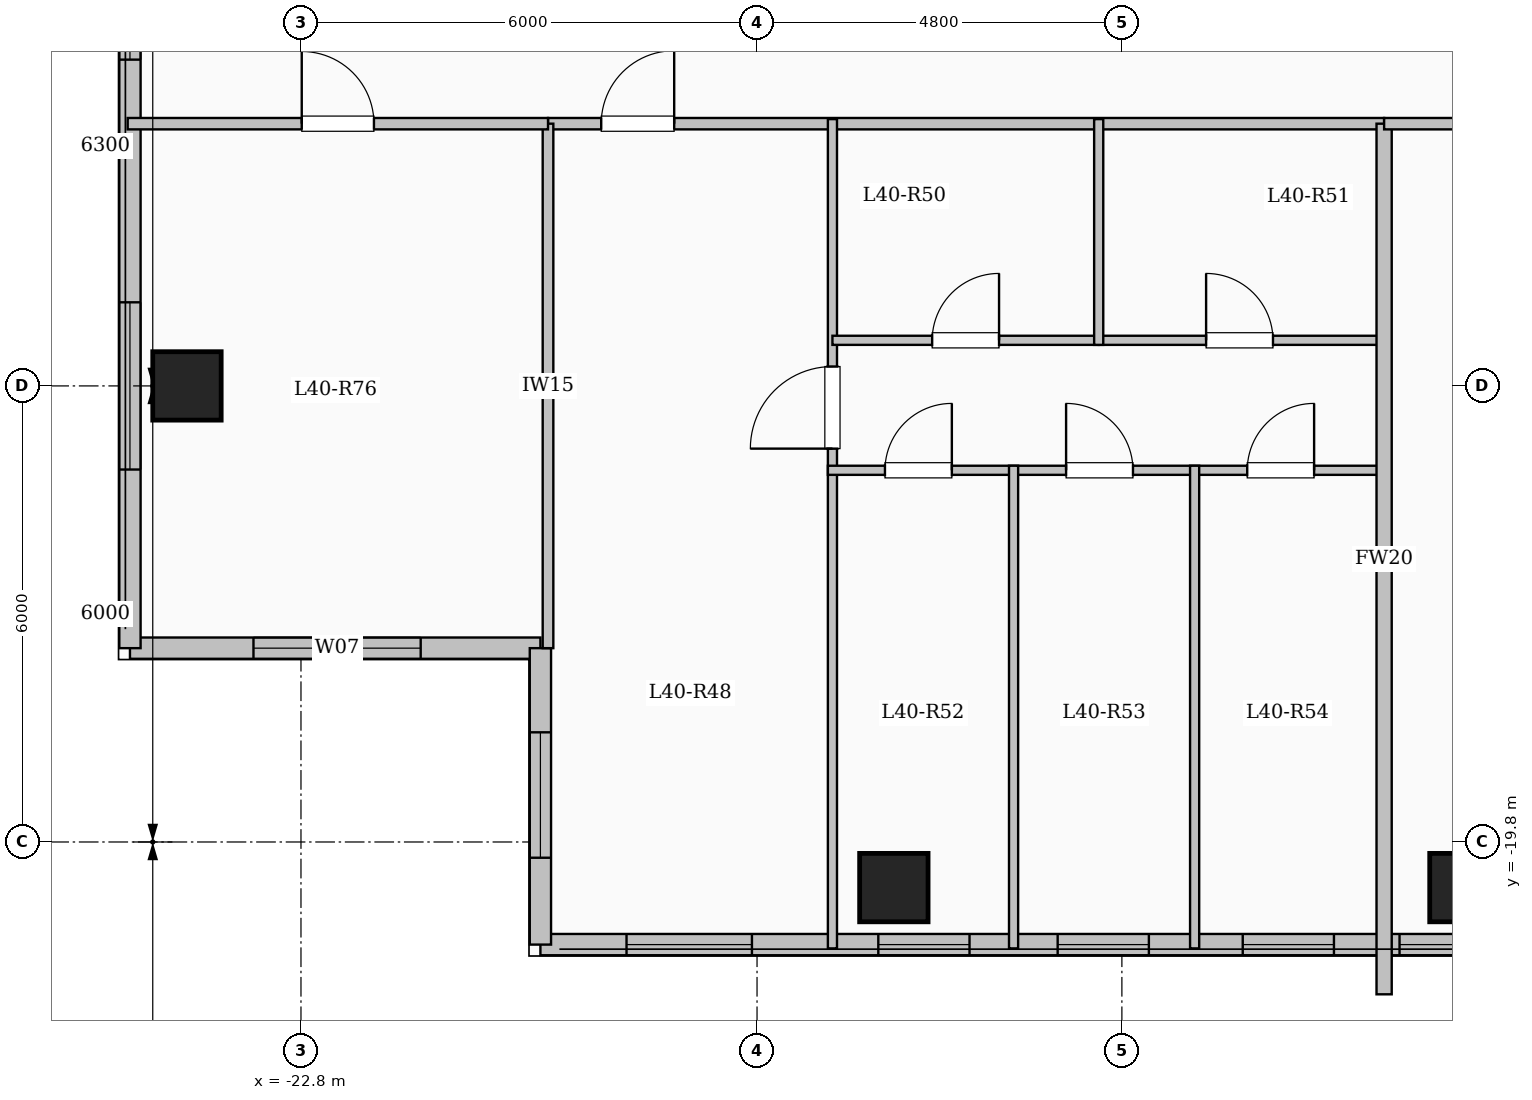
"""IFC4 building model, lengths in metres.
Left out: names, types, materials, properties, quantities, classifications, styles, units other than length and angle.
Written with IfcOpenShell. Run it as: python <this file> out.ifc"""

import sys

from ifc_helpers import new_model, si_unit, direction, frame, frame_2d, origin, origin_2d, place, context, subcontext, project, spatial, rectangle, extrude, element, fill, save


model = new_model("IFC4")
c1 = context("Model", 3, precision=1e-05, world=origin(), true_north=direction((0.0, 1.0)))
c2 = subcontext(c1, "Body", "Model", "MODEL_VIEW")
j1 = project(units=[si_unit("LENGTHUNIT", "METRE"), si_unit("PLANEANGLEUNIT", "RADIAN")], contexts=[c1])
p1 = place(None, origin())
s1 = spatial("IfcSite", under=j1, at=p1, CompositionType="ELEMENT")
p2 = place(p1, origin())
s2 = spatial("IfcBuilding", under=s1, at=p2, CompositionType="ELEMENT")
p3 = place(p2, frame((0.0, 0.0, 149.35)))
s3 = spatial("IfcBuildingStorey", under=s2, at=p3, CompositionType="ELEMENT", Elevation=149.35)
for number, where, z_axis, x_axis in (
    (1, (-15.0, -20.4, 0.0), (0.0, 0.0, 1.0), (1.0, 0.0, 0.0)),
    (2, (-7.5, -20.4, 0.0), (0.0, 0.0, 1.0), (1.0, 0.0, 0.0)),
    (3, (-24.3, -13.8, 0.0), (0.0, 0.0, 1.0), (1.0, 0.0, 0.0)),
):
    element("IfcColumn", number, at=place(p3, frame(where, z_axis=z_axis, x_axis=x_axis)), inside=s3, PredefinedType="COLUMN", context=c2, shape_type="SweptSolid", body=[
        extrude(rectangle(XDim=0.9, YDim=0.9, at=origin_2d()), origin(), (0.0, 0.0, 1.0), 3.35),
    ])
p4 = place(p3, frame((-19.65, -17.25, 0.0), z_axis=(0.0, 0.0, 1.0), x_axis=(-1.0, 0.0, 0.0)))
e4 = element("IfcWall", 4, at=p4, inside=s3, PredefinedType="SOLIDWALL", context=c2, shape_type="SweptSolid", body=[
    extrude(rectangle(XDim=5.4, YDim=0.28, at=frame_2d((2.7, 0.0))), origin(), (0.0, 0.0, 1.0), 3.1),
])
p5 = place(p4, frame((1.575, 0.0, 0.9)))
e5 = element("IfcOpeningElement", 5, at=p5, cuts=e4, PredefinedType="OPENING", context=c2, shape_type="SweptSolid", body=[
    extrude(rectangle(XDim=2.2, YDim=1.75, at=frame_2d((1.1, 0.875))), frame((0.0, 0.15, 0.0), z_axis=(0.0, -1.0, 0.0), x_axis=(1.0, 0.0, 0.0)), (0.0, 0.0, 1.0), 0.3),
])
p6 = place(p3, frame((-25.05, -17.25, 0.0), z_axis=(0.0, 0.0, 1.0), x_axis=(0.0, 1.0, 0.0)))
e6 = element("IfcWall", 6, at=p6, inside=s3, PredefinedType="SOLIDWALL", context=c2, shape_type="SweptSolid", body=[
    extrude(rectangle(XDim=34.5, YDim=0.28, at=frame_2d((17.25, 0.0))), origin(), (0.0, 0.0, 1.0), 3.1),
])
p7 = place(p6, frame((2.35, 0.0, 0.9)))
e7 = element("IfcOpeningElement", 7, at=p7, cuts=e6, PredefinedType="OPENING", context=c2, shape_type="SweptSolid", body=[
    extrude(rectangle(XDim=2.2, YDim=1.75, at=frame_2d((1.1, 0.875))), frame((0.0, 0.15, 0.0), z_axis=(0.0, -1.0, 0.0), x_axis=(1.0, 0.0, 0.0)), (0.0, 0.0, 1.0), 0.3),
])
p8 = place(p6, frame((7.742, 0.0, 0.9)))
e8 = element("IfcOpeningElement", 8, at=p8, cuts=e6, PredefinedType="OPENING", context=c2, shape_type="SweptSolid", body=[
    extrude(rectangle(XDim=1.5, YDim=1.65, at=frame_2d((0.75, 0.825))), frame((0.0, 0.15, 0.0), z_axis=(0.0, -1.0, 0.0), x_axis=(1.0, 0.0, 0.0)), (0.0, 0.0, 1.0), 0.3),
])
p9 = place(p6, frame((18.0, 0.0, 0.9)))
e9 = element("IfcOpeningElement", 9, at=p9, cuts=e6, PredefinedType="OPENING", context=c2, shape_type="SweptSolid", body=[
    extrude(rectangle(XDim=2.0, YDim=1.7, at=frame_2d((1.0, 0.85))), frame((0.0, 0.15, 0.0), z_axis=(0.0, -1.0, 0.0), x_axis=(1.0, 0.0, 0.0)), (0.0, 0.0, 1.0), 0.3),
])
p10 = place(p6, frame((28.375, 0.0, 0.95)))
e10 = element("IfcOpeningElement", 10, at=p10, cuts=e6, PredefinedType="OPENING", context=c2, shape_type="SweptSolid", body=[
    extrude(rectangle(XDim=1.0, YDim=1.5, at=frame_2d((0.5, 0.75))), frame((0.0, 0.15, 0.0), z_axis=(0.0, -1.0, 0.0), x_axis=(1.0, 0.0, 0.0)), (0.0, 0.0, 1.0), 0.3),
])
p11 = place(p6, frame((31.125, 0.0, 0.9)))
e11 = element("IfcOpeningElement", 11, at=p11, cuts=e6, PredefinedType="OPENING", context=c2, shape_type="SweptSolid", body=[
    extrude(rectangle(XDim=2.0, YDim=1.7, at=frame_2d((1.0, 0.85))), frame((0.0, 0.15, 0.0), z_axis=(0.0, -1.0, 0.0), x_axis=(1.0, 0.0, 0.0)), (0.0, 0.0, 1.0), 0.3),
])
p12 = place(p3, frame((-7.35, -21.15, 0.0), z_axis=(0.0, 0.0, 1.0), x_axis=(-1.0, 0.0, 0.0)))
e12 = element("IfcWall", 12, at=p12, inside=s3, PredefinedType="SOLIDWALL", context=c2, shape_type="SweptSolid", body=[
    extrude(rectangle(XDim=12.3, YDim=0.28, at=frame_2d((6.15, 0.0))), origin(), (0.0, 0.0, 1.0), 3.1),
])
p13 = place(p12, frame((0.147, 0.0, 0.95)))
e13 = element("IfcOpeningElement", 13, at=p13, cuts=e12, PredefinedType="OPENING", context=c2, shape_type="SweptSolid", body=[
    extrude(rectangle(XDim=0.85, YDim=1.5, at=frame_2d((0.425, 0.75))), frame((0.0, 0.15, 0.0), z_axis=(0.0, -1.0, 0.0), x_axis=(1.0, 0.0, 0.0)), (0.0, 0.0, 1.0), 0.3),
])
p14 = place(p12, frame((1.86, 0.0, 0.95)))
e14 = element("IfcOpeningElement", 14, at=p14, cuts=e12, PredefinedType="OPENING", context=c2, shape_type="SweptSolid", body=[
    extrude(rectangle(XDim=1.2, YDim=1.5, at=frame_2d((0.6, 0.75))), frame((0.0, 0.15, 0.0), z_axis=(0.0, -1.0, 0.0), x_axis=(1.0, 0.0, 0.0)), (0.0, 0.0, 1.0), 0.3),
])
p15 = place(p12, frame((4.295, 0.0, 0.95)))
e15 = element("IfcOpeningElement", 15, at=p15, cuts=e12, PredefinedType="OPENING", context=c2, shape_type="SweptSolid", body=[
    extrude(rectangle(XDim=1.2, YDim=1.5, at=frame_2d((0.6, 0.75))), frame((0.0, 0.15, 0.0), z_axis=(0.0, -1.0, 0.0), x_axis=(1.0, 0.0, 0.0)), (0.0, 0.0, 1.0), 0.3),
])
p16 = place(p12, frame((6.655, 0.0, 0.95)))
e16 = element("IfcOpeningElement", 16, at=p16, cuts=e12, PredefinedType="OPENING", context=c2, shape_type="SweptSolid", body=[
    extrude(rectangle(XDim=1.2, YDim=1.5, at=frame_2d((0.6, 0.75))), frame((0.0, 0.15, 0.0), z_axis=(0.0, -1.0, 0.0), x_axis=(1.0, 0.0, 0.0)), (0.0, 0.0, 1.0), 0.3),
])
p17 = place(p12, frame((9.517, 0.0, 0.9)))
e17 = element("IfcOpeningElement", 17, at=p17, cuts=e12, PredefinedType="OPENING", context=c2, shape_type="SweptSolid", body=[
    extrude(rectangle(XDim=1.65, YDim=1.6, at=frame_2d((0.825, 0.8))), frame((0.0, 0.15, 0.0), z_axis=(0.0, -1.0, 0.0), x_axis=(1.0, 0.0, 0.0)), (0.0, 0.0, 1.0), 0.3),
])
p18 = place(p3, frame((-19.65, -21.15, 0.0), z_axis=(0.0, 0.0, 1.0), x_axis=(0.0, 1.0, 0.0)))
e18 = element("IfcWall", 18, at=p18, inside=s3, PredefinedType="SOLIDWALL", context=c2, shape_type="SweptSolid", body=[
    extrude(rectangle(XDim=3.9, YDim=0.28, at=frame_2d((1.95, 0.0))), origin(), (0.0, 0.0, 1.0), 3.1),
])
p19 = place(p18, frame((1.143, 0.0, 0.9)))
e19 = element("IfcOpeningElement", 19, at=p19, cuts=e18, PredefinedType="OPENING", context=c2, shape_type="SweptSolid", body=[
    extrude(rectangle(XDim=1.65, YDim=1.6, at=frame_2d((0.825, 0.8))), frame((0.0, 0.15, 0.0), z_axis=(0.0, -1.0, 0.0), x_axis=(1.0, 0.0, 0.0)), (0.0, 0.0, 1.0), 0.3),
])
p20 = place(p3, frame((-19.55, -10.35, 0.0), z_axis=(0.0, 0.0, 1.0), x_axis=(1.0, 0.0, 0.0)))
e20 = element("IfcWall", 20, at=p20, inside=s3, PredefinedType="PARTITIONING", context=c2, shape_type="SweptSolid", body=[
    extrude(rectangle(XDim=11.0, YDim=0.15, at=frame_2d((5.5, 0.0))), origin(), (0.0, 0.0, 1.0), 3.1),
])
p21 = place(p20, frame((0.7, 0.0, 0.0)))
e21 = element("IfcOpeningElement", 21, at=p21, cuts=e20, PredefinedType="OPENING", context=c2, shape_type="SweptSolid", body=[
    extrude(rectangle(XDim=0.96, YDim=2.15, at=frame_2d((0.48, 1.075))), frame((0.0, 0.085, 0.0), z_axis=(0.0, -1.0, 0.0), x_axis=(1.0, 0.0, 0.0)), (0.0, 0.0, 1.0), 0.17),
])
p22 = place(p3, frame((-15.808, -21.2, 0.0), z_axis=(0.0, 0.0, 1.0), x_axis=(0.0, 1.0, 0.0)))
e22 = element("IfcWall", 22, at=p22, inside=s3, PredefinedType="PARTITIONING", context=c2, shape_type="SweptSolid", body=[
    extrude(rectangle(XDim=10.91, YDim=0.12, at=frame_2d((5.455, 0.0))), origin(), (0.0, 0.0, 1.0), 3.1),
])
p23 = place(p22, frame((6.575, 0.0, 0.0)))
e23 = element("IfcOpeningElement", 23, at=p23, cuts=e22, PredefinedType="OPENING", context=c2, shape_type="SweptSolid", body=[
    extrude(rectangle(XDim=1.08, YDim=2.15, at=frame_2d((0.54, 1.075))), frame((0.0, 0.07, 0.0), z_axis=(0.0, -1.0, 0.0), x_axis=(1.0, 0.0, 0.0)), (0.0, 0.0, 1.0), 0.14),
])
p24 = place(p3, frame((-15.808, -13.2, 0.0), z_axis=(0.0, 0.0, 1.0), x_axis=(1.0, 0.0, 0.0)))
e24 = element("IfcWall", 24, at=p24, inside=s3, PredefinedType="PARTITIONING", context=c2, shape_type="SweptSolid", body=[
    extrude(rectangle(XDim=3.503, YDim=0.12, at=frame_2d((1.751, 0.0))), origin(), (0.0, 0.0, 1.0), 3.1),
])
p25 = place(p24, frame((1.312, 0.0, 0.0)))
e25 = element("IfcOpeningElement", 25, at=p25, cuts=e24, PredefinedType="OPENING", context=c2, shape_type="SweptSolid", body=[
    extrude(rectangle(XDim=0.88, YDim=2.1, at=frame_2d((0.44, 1.05))), frame((0.0, 0.07, 0.0), z_axis=(0.0, -1.0, 0.0), x_axis=(1.0, 0.0, 0.0)), (0.0, 0.0, 1.0), 0.14),
])
p26 = place(p3, frame((-12.305, -13.2, 0.0), z_axis=(0.0, 0.0, 1.0), x_axis=(1.0, 0.0, 0.0)))
e26 = element("IfcWall", 26, at=p26, inside=s3, PredefinedType="PARTITIONING", context=c2, shape_type="SweptSolid", body=[
    extrude(rectangle(XDim=3.705, YDim=0.12, at=frame_2d((1.853, 0.0))), origin(), (0.0, 0.0, 1.0), 3.1),
])
p27 = place(p26, frame((1.413, 0.0, 0.0)))
e27 = element("IfcOpeningElement", 27, at=p27, cuts=e26, PredefinedType="OPENING", context=c2, shape_type="SweptSolid", body=[
    extrude(rectangle(XDim=0.88, YDim=2.1, at=frame_2d((0.44, 1.05))), frame((0.0, 0.07, 0.0), z_axis=(0.0, -1.0, 0.0), x_axis=(1.0, 0.0, 0.0)), (0.0, 0.0, 1.0), 0.14),
])
p28 = place(p3, frame((-15.868, -14.91, 0.0), z_axis=(0.0, 0.0, 1.0), x_axis=(1.0, 0.0, 0.0)))
e28 = element("IfcWall", 28, at=p28, inside=s3, PredefinedType="PARTITIONING", context=c2, shape_type="SweptSolid", body=[
    extrude(rectangle(XDim=7.328, YDim=0.12, at=frame_2d((3.664, 0.0))), origin(), (0.0, 0.0, 1.0), 3.1),
])
p29 = place(p28, frame((0.751, 0.0, 0.0)))
e29 = element("IfcOpeningElement", 29, at=p29, cuts=e28, PredefinedType="OPENING", context=c2, shape_type="SweptSolid", body=[
    extrude(rectangle(XDim=0.88, YDim=2.1, at=frame_2d((0.44, 1.05))), frame((0.0, 0.07, 0.0), z_axis=(0.0, -1.0, 0.0), x_axis=(1.0, 0.0, 0.0)), (0.0, 0.0, 1.0), 0.14),
])
p30 = place(p28, frame((3.134, 0.0, 0.0)))
e30 = element("IfcOpeningElement", 30, at=p30, cuts=e28, PredefinedType="OPENING", context=c2, shape_type="SweptSolid", body=[
    extrude(rectangle(XDim=0.88, YDim=2.1, at=frame_2d((0.44, 1.05))), frame((0.0, 0.07, 0.0), z_axis=(0.0, -1.0, 0.0), x_axis=(1.0, 0.0, 0.0)), (0.0, 0.0, 1.0), 0.14),
])
p31 = place(p28, frame((5.517, 0.0, 0.0)))
e31 = element("IfcOpeningElement", 31, at=p31, cuts=e28, PredefinedType="OPENING", context=c2, shape_type="SweptSolid", body=[
    extrude(rectangle(XDim=0.88, YDim=2.1, at=frame_2d((0.44, 1.05))), frame((0.0, 0.07, 0.0), z_axis=(0.0, -1.0, 0.0), x_axis=(1.0, 0.0, 0.0)), (0.0, 0.0, 1.0), 0.14),
])
p32 = place(p3, frame((-12.305, -13.26, 0.0), z_axis=(0.0, 0.0, 1.0), x_axis=(0.0, 1.0, 0.0)))
e32 = element("IfcWall", 32, at=p32, inside=s3, PredefinedType="PARTITIONING", context=c2, shape_type="SweptSolid", body=[
    extrude(rectangle(XDim=2.97, YDim=0.12, at=frame_2d((1.485, 0.0))), origin(), (0.0, 0.0, 1.0), 3.1),
])
for number, where, z_axis, x_axis in (
    (33, (-13.425, -21.2, 0.0), (0.0, 0.0, 1.0), (0.0, 1.0, 0.0)),
    (34, (-11.043, -21.2, 0.0), (0.0, 0.0, 1.0), (0.0, 1.0, 0.0)),
):
    element("IfcWall", number, at=place(p3, frame(where, z_axis=z_axis, x_axis=x_axis)), inside=s3, PredefinedType="PARTITIONING", context=c2, shape_type="SweptSolid", body=[
        extrude(rectangle(XDim=6.35, YDim=0.12, at=frame_2d((3.175, 0.0))), origin(), (0.0, 0.0, 1.0), 3.1),
    ])
p33 = place(p3, frame((-8.55, -21.804, 0.0), z_axis=(0.0, 0.0, 1.0), x_axis=(0.0, 1.0, 0.0)))
e35 = element("IfcWall", 35, at=p33, inside=s3, PredefinedType="SOLIDWALL", context=c2, shape_type="SweptSolid", body=[
    extrude(rectangle(XDim=11.454, YDim=0.2, at=frame_2d((5.727, 0.0))), origin(), (0.0, 0.0, 1.0), 3.1),
])
p34 = place(p3, frame((-8.55, -10.35, 0.0), z_axis=(0.0, 0.0, 1.0), x_axis=(1.0, 0.0, 0.0)))
e36 = element("IfcWall", 36, at=p34, inside=s3, PredefinedType="PARTITIONING", context=c2, shape_type="SweptSolid", body=[
    extrude(rectangle(XDim=17.1, YDim=0.15, at=frame_2d((8.55, 0.0))), origin(), (0.0, 0.0, 1.0), 3.1),
])
p35 = place(p34, frame((1.6, 0.0, 0.0)))
e37 = element("IfcOpeningElement", 37, at=p35, cuts=e36, PredefinedType="OPENING", context=c2, shape_type="SweptSolid", body=[
    extrude(rectangle(XDim=0.96, YDim=2.15, at=frame_2d((0.48, 1.075))), frame((0.0, 0.085, 0.0), z_axis=(0.0, -1.0, 0.0), x_axis=(1.0, 0.0, 0.0)), (0.0, 0.0, 1.0), 0.17),
])
p36 = place(p3, frame((-19.55, -17.25, 0.0), z_axis=(0.0, 0.0, 1.0), x_axis=(0.0, 1.0, 0.0)))
e38 = element("IfcWall", 38, at=p36, inside=s3, PredefinedType="PARTITIONING", context=c2, shape_type="SweptSolid", body=[
    extrude(rectangle(XDim=6.9, YDim=0.14, at=frame_2d((3.45, 0.0))), origin(), (0.0, 0.0, 1.0), 3.1),
])
p37 = place(p3, frame((-25.08, -10.35, 0.0), z_axis=(0.0, 0.0, 1.0), x_axis=(1.0, 0.0, 0.0)))
e39 = element("IfcWall", 39, at=p37, inside=s3, PredefinedType="PARTITIONING", context=c2, shape_type="SweptSolid", body=[
    extrude(rectangle(XDim=5.53, YDim=0.15, at=frame_2d((2.765, 0.0))), origin(), (0.0, 0.0, 1.0), 3.1),
])
p38 = place(p37, frame((2.29, 0.0, 0.0)))
e40 = element("IfcOpeningElement", 40, at=p38, cuts=e39, PredefinedType="OPENING", context=c2, shape_type="SweptSolid", body=[
    extrude(rectangle(XDim=0.95, YDim=2.15, at=frame_2d((0.475, 1.075))), frame((0.0, 0.085, 0.0), z_axis=(0.0, -1.0, 0.0), x_axis=(1.0, 0.0, 0.0)), (0.0, 0.0, 1.0), 0.17),
])
p39 = place(p5, origin())
e41 = element("IfcWindow", 41, at=p39, inside=s3, PartitioningType="SINGLE_PANEL", PredefinedType="WINDOW", context=c2, shape_type="SweptSolid", body=[
    extrude(rectangle(XDim=2.2, YDim=1.75, at=frame_2d((1.1, 0.875))), frame((0.0, 0.03, 0.0), z_axis=(0.0, -1.0, 0.0), x_axis=(1.0, 0.0, 0.0)), (0.0, 0.0, 1.0), 0.06),
])
fill(e5, e41)
p40 = place(p7, origin())
e42 = element("IfcWindow", 42, at=p40, inside=s3, PartitioningType="SINGLE_PANEL", PredefinedType="WINDOW", context=c2, shape_type="SweptSolid", body=[
    extrude(rectangle(XDim=2.2, YDim=1.75, at=frame_2d((1.1, 0.875))), frame((0.0, 0.03, 0.0), z_axis=(0.0, -1.0, 0.0), x_axis=(1.0, 0.0, 0.0)), (0.0, 0.0, 1.0), 0.06),
])
fill(e7, e42)
p41 = place(p8, origin())
e43 = element("IfcWindow", 43, at=p41, inside=s3, PartitioningType="SINGLE_PANEL", PredefinedType="WINDOW", context=c2, shape_type="SweptSolid", body=[
    extrude(rectangle(XDim=1.5, YDim=1.65, at=frame_2d((0.75, 0.825))), frame((0.0, 0.03, 0.0), z_axis=(0.0, -1.0, 0.0), x_axis=(1.0, 0.0, 0.0)), (0.0, 0.0, 1.0), 0.06),
])
fill(e8, e43)
p42 = place(p13, origin())
e44 = element("IfcWindow", 44, at=p42, inside=s3, PartitioningType="SINGLE_PANEL", PredefinedType="WINDOW", context=c2, shape_type="SweptSolid", body=[
    extrude(rectangle(XDim=0.85, YDim=1.5, at=frame_2d((0.425, 0.75))), frame((0.0, 0.03, 0.0), z_axis=(0.0, -1.0, 0.0), x_axis=(1.0, 0.0, 0.0)), (0.0, 0.0, 1.0), 0.06),
])
fill(e13, e44)
p43 = place(p14, origin())
e45 = element("IfcWindow", 45, at=p43, inside=s3, PartitioningType="SINGLE_PANEL", PredefinedType="WINDOW", context=c2, shape_type="SweptSolid", body=[
    extrude(rectangle(XDim=1.2, YDim=1.5, at=frame_2d((0.6, 0.75))), frame((0.0, 0.03, 0.0), z_axis=(0.0, -1.0, 0.0), x_axis=(1.0, 0.0, 0.0)), (0.0, 0.0, 1.0), 0.06),
])
fill(e14, e45)
p44 = place(p15, origin())
e46 = element("IfcWindow", 46, at=p44, inside=s3, PartitioningType="SINGLE_PANEL", PredefinedType="WINDOW", context=c2, shape_type="SweptSolid", body=[
    extrude(rectangle(XDim=1.2, YDim=1.5, at=frame_2d((0.6, 0.75))), frame((0.0, 0.03, 0.0), z_axis=(0.0, -1.0, 0.0), x_axis=(1.0, 0.0, 0.0)), (0.0, 0.0, 1.0), 0.06),
])
fill(e15, e46)
p45 = place(p16, origin())
e47 = element("IfcWindow", 47, at=p45, inside=s3, PartitioningType="SINGLE_PANEL", PredefinedType="WINDOW", context=c2, shape_type="SweptSolid", body=[
    extrude(rectangle(XDim=1.2, YDim=1.5, at=frame_2d((0.6, 0.75))), frame((0.0, 0.03, 0.0), z_axis=(0.0, -1.0, 0.0), x_axis=(1.0, 0.0, 0.0)), (0.0, 0.0, 1.0), 0.06),
])
fill(e16, e47)
p46 = place(p17, origin())
e48 = element("IfcWindow", 48, at=p46, inside=s3, PartitioningType="SINGLE_PANEL", PredefinedType="WINDOW", context=c2, shape_type="SweptSolid", body=[
    extrude(rectangle(XDim=1.65, YDim=1.6, at=frame_2d((0.825, 0.8))), frame((0.0, 0.03, 0.0), z_axis=(0.0, -1.0, 0.0), x_axis=(1.0, 0.0, 0.0)), (0.0, 0.0, 1.0), 0.06),
])
fill(e17, e48)
p47 = place(p19, origin())
e49 = element("IfcWindow", 49, at=p47, inside=s3, PartitioningType="SINGLE_PANEL", PredefinedType="WINDOW", context=c2, shape_type="SweptSolid", body=[
    extrude(rectangle(XDim=1.65, YDim=1.6, at=frame_2d((0.825, 0.8))), frame((0.0, 0.03, 0.0), z_axis=(0.0, -1.0, 0.0), x_axis=(1.0, 0.0, 0.0)), (0.0, 0.0, 1.0), 0.06),
])
fill(e19, e49)
p48 = place(p21, origin())
e50 = element("IfcDoor", 50, at=p48, inside=s3, OperationType="SINGLE_SWING_RIGHT", PredefinedType="DOOR", context=c2, shape_type="SweptSolid", body=[
    extrude(rectangle(XDim=0.96, YDim=2.15, at=frame_2d((0.48, 1.075))), frame((0.0, 0.025, 0.0), z_axis=(0.0, -1.0, 0.0), x_axis=(1.0, 0.0, 0.0)), (0.0, 0.0, 1.0), 0.05),
])
fill(e21, e50)
p49 = place(p23, origin())
e51 = element("IfcDoor", 51, at=p49, inside=s3, OperationType="SINGLE_SWING_LEFT", PredefinedType="DOOR", context=c2, shape_type="SweptSolid", body=[
    extrude(rectangle(XDim=1.08, YDim=2.15, at=frame_2d((0.54, 1.075))), frame((0.0, 0.025, 0.0), z_axis=(0.0, -1.0, 0.0), x_axis=(1.0, 0.0, 0.0)), (0.0, 0.0, 1.0), 0.05),
])
fill(e23, e51)
p50 = place(p25, origin())
e52 = element("IfcDoor", 52, at=p50, inside=s3, OperationType="SINGLE_SWING_RIGHT", PredefinedType="DOOR", context=c2, shape_type="SweptSolid", body=[
    extrude(rectangle(XDim=0.88, YDim=2.1, at=frame_2d((0.44, 1.05))), frame((0.0, 0.025, 0.0), z_axis=(0.0, -1.0, 0.0), x_axis=(1.0, 0.0, 0.0)), (0.0, 0.0, 1.0), 0.05),
])
fill(e25, e52)
p51 = place(p27, origin())
e53 = element("IfcDoor", 53, at=p51, inside=s3, OperationType="SINGLE_SWING_LEFT", PredefinedType="DOOR", context=c2, shape_type="SweptSolid", body=[
    extrude(rectangle(XDim=0.88, YDim=2.1, at=frame_2d((0.44, 1.05))), frame((0.0, 0.025, 0.0), z_axis=(0.0, -1.0, 0.0), x_axis=(1.0, 0.0, 0.0)), (0.0, 0.0, 1.0), 0.05),
])
fill(e27, e53)
p52 = place(p29, origin())
e54 = element("IfcDoor", 54, at=p52, inside=s3, OperationType="SINGLE_SWING_RIGHT", PredefinedType="DOOR", context=c2, shape_type="SweptSolid", body=[
    extrude(rectangle(XDim=0.88, YDim=2.1, at=frame_2d((0.44, 1.05))), frame((0.0, 0.025, 0.0), z_axis=(0.0, -1.0, 0.0), x_axis=(1.0, 0.0, 0.0)), (0.0, 0.0, 1.0), 0.05),
])
fill(e29, e54)
p53 = place(p30, origin())
e55 = element("IfcDoor", 55, at=p53, inside=s3, OperationType="SINGLE_SWING_LEFT", PredefinedType="DOOR", context=c2, shape_type="SweptSolid", body=[
    extrude(rectangle(XDim=0.88, YDim=2.1, at=frame_2d((0.44, 1.05))), frame((0.0, 0.025, 0.0), z_axis=(0.0, -1.0, 0.0), x_axis=(1.0, 0.0, 0.0)), (0.0, 0.0, 1.0), 0.05),
])
fill(e30, e55)
p54 = place(p31, origin())
e56 = element("IfcDoor", 56, at=p54, inside=s3, OperationType="SINGLE_SWING_RIGHT", PredefinedType="DOOR", context=c2, shape_type="SweptSolid", body=[
    extrude(rectangle(XDim=0.88, YDim=2.1, at=frame_2d((0.44, 1.05))), frame((0.0, 0.025, 0.0), z_axis=(0.0, -1.0, 0.0), x_axis=(1.0, 0.0, 0.0)), (0.0, 0.0, 1.0), 0.05),
])
fill(e31, e56)
p55 = place(p38, origin())
e57 = element("IfcDoor", 57, at=p55, inside=s3, OperationType="SINGLE_SWING_LEFT", PredefinedType="DOOR", context=c2, shape_type="SweptSolid", body=[
    extrude(rectangle(XDim=0.95, YDim=2.15, at=frame_2d((0.475, 1.075))), frame((0.0, 0.025, 0.0), z_axis=(0.0, -1.0, 0.0), x_axis=(1.0, 0.0, 0.0)), (0.0, 0.0, 1.0), 0.05),
])
fill(e40, e57)
save(model, sys.argv[1])
